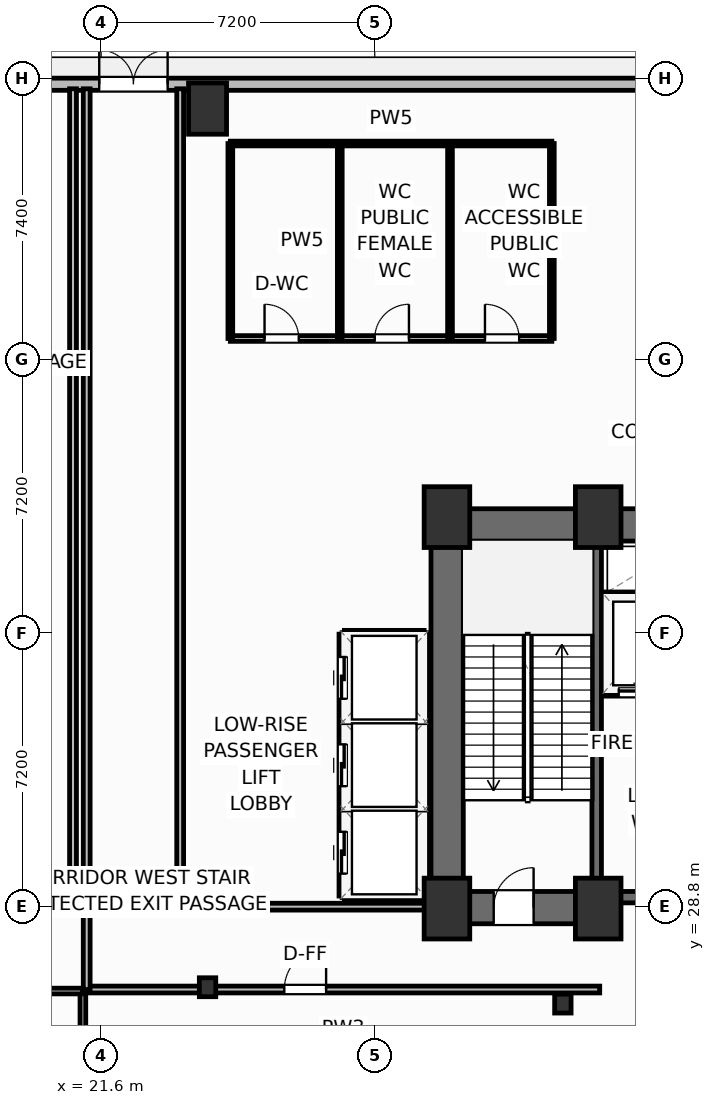
"""IFC4 building model, lengths in metres.
Left out: names, types, materials, properties, quantities, classifications, styles, units other than length and angle.
Written with IfcOpenShell. Run it as: python <this file> out.ifc"""

import sys

from ifc_helpers import new_model, si_unit, direction, frame, frame_2d, origin, origin_2d, place, context, subcontext, project, spatial, rectangle, i_section, extrude, element, fill, save


model = new_model("IFC4")
c1 = context("Model", 3, precision=1e-05, world=origin(), true_north=direction((0.0, 1.0)))
c2 = subcontext(c1, "Body", "Model", "MODEL_VIEW")
j1 = project(units=[si_unit("LENGTHUNIT", "METRE"), si_unit("PLANEANGLEUNIT", "RADIAN")], contexts=[c1])
p1 = place(None, origin())
s1 = spatial("IfcSite", under=j1, at=p1, CompositionType="ELEMENT")
p2 = place(p1, origin())
s2 = spatial("IfcBuilding", under=s1, at=p2, CompositionType="ELEMENT")
p3 = place(p2, origin())
s3 = spatial("IfcBuildingStorey", under=s2, at=p3, CompositionType="ELEMENT", Elevation=0.0)
for number, where, z_axis, x_axis in (
    (1, (30.7, 28.75, 0.0), (0.0, 0.0, 1.0), (1.0, 0.0, 0.0)),
    (2, (34.68, 28.75, 0.0), (0.0, 0.0, 1.0), (1.0, 0.0, 0.0)),
    (3, (30.7, 39.05, 0.0), (0.0, 0.0, 1.0), (1.0, 0.0, 0.0)),
    (4, (34.68, 39.05, 0.0), (0.0, 0.0, 1.0), (1.0, 0.0, 0.0)),
):
    element("IfcColumn", number, at=place(p3, frame(where, z_axis=z_axis, x_axis=x_axis)), inside=s3, PredefinedType="COLUMN", context=c2, shape_type="SweptSolid", body=[
        extrude(rectangle(XDim=1.2, YDim=1.6, at=origin_2d()), origin(), (0.0, 0.0, 1.0), 5.4),
    ])
for number, where, z_axis, x_axis in (
    (5, (33.75, 26.25, 0.0), (0.0, 0.0, 1.0), (1.0, 0.0, 0.0)),
    (6, (24.4, 26.68, 0.0), (0.0, 0.0, 1.0), (1.0, 0.0, 0.0)),
):
    element("IfcColumn", number, at=place(p3, frame(where, z_axis=z_axis, x_axis=x_axis)), inside=s3, PredefinedType="COLUMN", context=c2, shape_type="SweptSolid", body=[
        extrude(i_section(OverallWidth=0.432, OverallDepth=0.498, WebThickness=0.056, FlangeThickness=0.089, FilletRadius=0.025, at=origin_2d()), origin(), (0.0, 0.0, 1.0), 5.4),
    ])
p4 = place(p3, frame((30.28, 38.845, 0.0), z_axis=(0.0, 0.0, 1.0), x_axis=(1.0, 0.0, 0.0)))
e7 = element("IfcWall", 7, at=p4, inside=s3, PredefinedType="SHEAR", context=c2, shape_type="SweptSolid", body=[
    extrude(rectangle(XDim=17.84, YDim=0.85, at=frame_2d((8.92, 0.0))), origin(), (0.0, 0.0, 1.0), 5.12),
])
p5 = place(p3, frame((30.705, 29.2, 0.0), z_axis=(0.0, 0.0, 1.0), x_axis=(0.0, 1.0, 0.0)))
e8 = element("IfcWall", 8, at=p5, inside=s3, PredefinedType="SHEAR", context=c2, shape_type="SweptSolid", body=[
    extrude(rectangle(XDim=9.22, YDim=0.85, at=frame_2d((4.61, 0.0))), origin(), (0.0, 0.0, 1.0), 5.12),
])
p6 = place(p3, frame((30.28, 28.775, 0.0), z_axis=(0.0, 0.0, 1.0), x_axis=(1.0, 0.0, 0.0)))
e9 = element("IfcWall", 9, at=p6, inside=s3, PredefinedType="SHEAR", context=c2, shape_type="SweptSolid", body=[
    extrude(rectangle(XDim=4.52, YDim=0.85, at=frame_2d((2.26, 0.0))), origin(), (0.0, 0.0, 1.0), 5.12),
])
p7 = place(p6, frame((1.65, 0.0, 0.0)))
e10 = element("IfcOpeningElement", 10, at=p7, cuts=e9, PredefinedType="OPENING", context=c2, shape_type="SweptSolid", body=[
    extrude(rectangle(XDim=1.05, YDim=2.15, at=frame_2d((0.525, 1.075))), frame((0.0, 0.435, 0.0), z_axis=(0.0, -1.0, 0.0), x_axis=(1.0, 0.0, 0.0)), (0.0, 0.0, 1.0), 0.87),
])
p8 = place(p3, frame((34.8, 29.05, 0.0), z_axis=(0.0, 0.0, 1.0), x_axis=(1.0, 0.0, 0.0)))
e11 = element("IfcWall", 11, at=p8, inside=s3, PredefinedType="SHEAR", context=c2, shape_type="SweptSolid", body=[
    extrude(rectangle(XDim=8.8, YDim=0.3, at=frame_2d((4.4, 0.0))), origin(), (0.0, 0.0, 1.0), 5.12),
])
p9 = place(p8, frame((0.95, 0.0, 0.0)))
e12 = element("IfcOpeningElement", 12, at=p9, cuts=e11, PredefinedType="OPENING", context=c2, shape_type="SweptSolid", body=[
    extrude(rectangle(XDim=1.1, YDim=2.15, at=frame_2d((0.55, 1.075))), frame((0.0, 0.16, 0.0), z_axis=(0.0, -1.0, 0.0), x_axis=(1.0, 0.0, 0.0)), (0.0, 0.0, 1.0), 0.32),
])
p10 = place(p8, frame((6.75, 0.0, 0.0)))
e13 = element("IfcOpeningElement", 13, at=p10, cuts=e11, PredefinedType="OPENING", context=c2, shape_type="SweptSolid", body=[
    extrude(rectangle(XDim=1.1, YDim=2.15, at=frame_2d((0.55, 1.075))), frame((0.0, 0.16, 0.0), z_axis=(0.0, -1.0, 0.0), x_axis=(1.0, 0.0, 0.0)), (0.0, 0.0, 1.0), 0.32),
])
p11 = place(p8, frame((3.32, 0.0, 0.0)))
e14 = element("IfcOpeningElement", 14, at=p11, cuts=e11, PredefinedType="OPENING", context=c2, shape_type="SweptSolid", body=[
    extrude(rectangle(XDim=0.95, YDim=2.15, at=frame_2d((0.475, 1.075))), frame((0.0, 0.16, 0.0), z_axis=(0.0, -1.0, 0.0), x_axis=(1.0, 0.0, 0.0)), (0.0, 0.0, 1.0), 0.32),
])
p12 = place(p3, frame((34.64, 29.2, 0.0), z_axis=(0.0, 0.0, 1.0), x_axis=(0.0, 1.0, 0.0)))
e15 = element("IfcWall", 15, at=p12, inside=s3, PredefinedType="SHEAR", context=c2, shape_type="SweptSolid", body=[
    extrude(rectangle(XDim=9.22, YDim=0.25, at=frame_2d((4.61, 0.0))), origin(), (0.0, 0.0, 1.0), 5.12),
])
p13 = place(p3, frame((24.4, 49.8, 0.0), z_axis=(0.0, 0.0, 1.0), x_axis=(1.0, 0.0, 0.0)))
e16 = element("IfcColumn", 16, at=p13, inside=s3, PredefinedType="COLUMN", context=c2, shape_type="SweptSolid", body=[
    extrude(rectangle(XDim=1.0, YDim=1.35, at=origin_2d()), origin(), (0.0, 0.0, 1.0), 5.4),
])
p14 = place(p3, frame((5.6, 50.44, 0.0), z_axis=(0.0, 0.0, 1.0), x_axis=(1.0, 0.0, 0.0)))
e17 = element("IfcWall", 17, at=p14, inside=s3, PredefinedType="SOLIDWALL", context=c2, shape_type="SweptSolid", body=[
    extrude(rectangle(XDim=67.2, YDim=0.32, at=frame_2d((33.6, 0.0))), origin(), (0.0, 0.0, 1.0), 4.07),
])
p15 = place(p14, frame((10.05, 0.0, 0.0)))
e18 = element("IfcOpeningElement", 18, at=p15, cuts=e17, PredefinedType="OPENING", context=c2, shape_type="SweptSolid", body=[
    extrude(rectangle(XDim=1.8, YDim=2.2, at=frame_2d((0.9, 1.1))), frame((0.0, 0.17, 0.0), z_axis=(0.0, -1.0, 0.0), x_axis=(1.0, 0.0, 0.0)), (0.0, 0.0, 1.0), 0.34),
])
p16 = place(p14, frame((15.95, 0.0, 0.0)))
e19 = element("IfcOpeningElement", 19, at=p16, cuts=e17, PredefinedType="OPENING", context=c2, shape_type="SweptSolid", body=[
    extrude(rectangle(XDim=1.8, YDim=2.2, at=frame_2d((0.9, 1.1))), frame((0.0, 0.17, 0.0), z_axis=(0.0, -1.0, 0.0), x_axis=(1.0, 0.0, 0.0)), (0.0, 0.0, 1.0), 0.34),
])
p17 = place(p14, frame((43.45, 0.0, 0.0)))
e20 = element("IfcOpeningElement", 20, at=p17, cuts=e17, PredefinedType="OPENING", context=c2, shape_type="SweptSolid", body=[
    extrude(rectangle(XDim=1.8, YDim=2.2, at=frame_2d((0.9, 1.1))), frame((0.0, 0.17, 0.0), z_axis=(0.0, -1.0, 0.0), x_axis=(1.0, 0.0, 0.0)), (0.0, 0.0, 1.0), 0.34),
])
p18 = place(p14, frame((50.5, 0.0, 0.0)))
e21 = element("IfcOpeningElement", 21, at=p18, cuts=e17, PredefinedType="OPENING", context=c2, shape_type="SweptSolid", body=[
    extrude(rectangle(XDim=1.8, YDim=2.2, at=frame_2d((0.9, 1.1))), frame((0.0, 0.17, 0.0), z_axis=(0.0, -1.0, 0.0), x_axis=(1.0, 0.0, 0.0)), (0.0, 0.0, 1.0), 0.34),
])
p19 = place(p14, frame((57.8, 0.0, 0.0)))
e22 = element("IfcOpeningElement", 22, at=p19, cuts=e17, PredefinedType="OPENING", context=c2, shape_type="SweptSolid", body=[
    extrude(rectangle(XDim=6.0, YDim=3.2, at=frame_2d((3.0, 1.6))), frame((0.0, 0.17, 0.0), z_axis=(0.0, -1.0, 0.0), x_axis=(1.0, 0.0, 0.0)), (0.0, 0.0, 1.0), 0.34),
])
p20 = place(p3, frame((25.0, 43.75, 0.0), z_axis=(0.0, 0.0, 1.0), x_axis=(1.0, 0.0, 0.0)))
e23 = element("IfcWall", 23, at=p20, inside=s3, PredefinedType="PARTITIONING", context=c2, shape_type="SweptSolid", body=[
    extrude(rectangle(XDim=8.46, YDim=0.15, at=frame_2d((4.23, 0.0))), origin(), (0.0, 0.0, 1.0), 5.12),
])
p21 = place(p20, frame((0.9, 0.0, 0.0)))
e24 = element("IfcOpeningElement", 24, at=p21, cuts=e23, PredefinedType="OPENING", context=c2, shape_type="SweptSolid", body=[
    extrude(rectangle(XDim=0.9, YDim=2.05, at=frame_2d((0.45, 1.025))), frame((0.0, 0.085, 0.0), z_axis=(0.0, -1.0, 0.0), x_axis=(1.0, 0.0, 0.0)), (0.0, 0.0, 1.0), 0.17),
])
p22 = place(p20, frame((3.8, 0.0, 0.0)))
e25 = element("IfcOpeningElement", 25, at=p22, cuts=e23, PredefinedType="OPENING", context=c2, shape_type="SweptSolid", body=[
    extrude(rectangle(XDim=0.9, YDim=2.05, at=frame_2d((0.45, 1.025))), frame((0.0, 0.085, 0.0), z_axis=(0.0, -1.0, 0.0), x_axis=(1.0, 0.0, 0.0)), (0.0, 0.0, 1.0), 0.17),
])
p23 = place(p20, frame((6.7, 0.0, 0.0)))
e26 = element("IfcOpeningElement", 26, at=p23, cuts=e23, PredefinedType="OPENING", context=c2, shape_type="SweptSolid", body=[
    extrude(rectangle(XDim=0.9, YDim=2.05, at=frame_2d((0.45, 1.025))), frame((0.0, 0.085, 0.0), z_axis=(0.0, -1.0, 0.0), x_axis=(1.0, 0.0, 0.0)), (0.0, 0.0, 1.0), 0.17),
])
for number, where, z_axis, x_axis in (
    (27, (25.0, 43.75, 0.0), (0.0, 0.0, 1.0), (0.0, 1.0, 0.0)),
    (28, (27.88, 43.75, 0.0), (0.0, 0.0, 1.0), (0.0, 1.0, 0.0)),
    (29, (30.78, 43.75, 0.0), (0.0, 0.0, 1.0), (0.0, 1.0, 0.0)),
    (30, (33.46, 43.75, 0.0), (0.0, 0.0, 1.0), (0.0, 1.0, 0.0)),
):
    element("IfcWall", number, at=place(p3, frame(where, z_axis=z_axis, x_axis=x_axis)), inside=s3, PredefinedType="PARTITIONING", context=c2, shape_type="SweptSolid", body=[
        extrude(rectangle(XDim=5.13, YDim=0.125, at=frame_2d((2.565, 0.0))), origin(), (0.0, 0.0, 1.0), 5.12),
    ])
p24 = place(p3, frame((25.0, 48.88, 0.0), z_axis=(0.0, 0.0, 1.0), x_axis=(1.0, 0.0, 0.0)))
e31 = element("IfcWall", 31, at=p24, inside=s3, PredefinedType="PARTITIONING", context=c2, shape_type="SweptSolid", body=[
    extrude(rectangle(XDim=8.46, YDim=0.125, at=frame_2d((4.23, 0.0))), origin(), (0.0, 0.0, 1.0), 5.12),
])
p25 = place(p3, frame((18.47, 29.02, 0.0), z_axis=(0.0, 0.0, 1.0), x_axis=(1.0, 0.0, 0.0)))
e32 = element("IfcWall", 32, at=p25, inside=s3, PredefinedType="PARTITIONING", context=c2, shape_type="SweptSolid", body=[
    extrude(rectangle(XDim=2.39, YDim=0.18, at=frame_2d((1.195, 0.0))), origin(), (0.0, 0.0, 1.0), 5.12),
])
p26 = place(p3, frame((20.86, 29.02, 0.0), z_axis=(0.0, 0.0, 1.0), x_axis=(0.0, 1.0, 0.0)))
e33 = element("IfcWall", 33, at=p26, inside=s3, PredefinedType="PARTITIONING", context=c2, shape_type="SweptSolid", body=[
    extrude(rectangle(XDim=21.3, YDim=0.18, at=frame_2d((10.65, 0.0))), origin(), (0.0, 0.0, 1.0), 5.12),
])
p27 = place(p3, frame((21.22, 26.62, 0.0), z_axis=(0.0, 0.0, 1.0), x_axis=(1.0, 0.0, 0.0)))
e34 = element("IfcWall", 34, at=p27, inside=s3, PredefinedType="PARTITIONING", context=c2, shape_type="SweptSolid", body=[
    extrude(rectangle(XDim=13.5, YDim=0.18, at=frame_2d((6.75, 0.0))), origin(), (0.0, 0.0, 1.0), 4.332),
])
p28 = place(p27, frame((5.2, 0.0, 0.0)))
e35 = element("IfcOpeningElement", 35, at=p28, cuts=e34, PredefinedType="OPENING", context=c2, shape_type="SweptSolid", body=[
    extrude(rectangle(XDim=1.1, YDim=2.15, at=frame_2d((0.55, 1.075))), frame((0.0, 0.1, 0.0), z_axis=(0.0, -1.0, 0.0), x_axis=(1.0, 0.0, 0.0)), (0.0, 0.0, 1.0), 0.2),
])
p29 = place(p3, frame((21.22, 26.62, 0.0), z_axis=(0.0, 0.0, 1.0), x_axis=(0.0, 1.0, 0.0)))
e36 = element("IfcWall", 36, at=p29, inside=s3, PredefinedType="PARTITIONING", context=c2, shape_type="SweptSolid", body=[
    extrude(rectangle(XDim=23.7, YDim=0.18, at=frame_2d((11.85, 0.0))), origin(), (0.0, 0.0, 1.0), 5.12),
])
p30 = place(p3, frame((23.68, 28.8, 0.0), z_axis=(0.0, 0.0, 1.0), x_axis=(0.0, 1.0, 0.0)))
e37 = element("IfcWall", 37, at=p30, inside=s3, PredefinedType="PARTITIONING", context=c2, shape_type="SweptSolid", body=[
    extrude(rectangle(XDim=21.52, YDim=0.18, at=frame_2d((10.76, 0.0))), origin(), (0.0, 0.0, 1.0), 5.12),
])
p31 = place(p3, frame((23.68, 28.8, 0.0), z_axis=(0.0, 0.0, 1.0), x_axis=(1.0, 0.0, 0.0)))
e38 = element("IfcWall", 38, at=p31, inside=s3, PredefinedType="PARTITIONING", context=c2, shape_type="SweptSolid", body=[
    extrude(rectangle(XDim=6.6, YDim=0.18, at=frame_2d((3.3, 0.0))), origin(), (0.0, 0.0, 1.0), 5.12),
])
p32 = place(p3, frame((21.12, 19.24, 0.0), z_axis=(0.0, 0.0, 1.0), x_axis=(0.0, 1.0, 0.0)))
e39 = element("IfcWall", 39, at=p32, inside=s3, PredefinedType="PARTITIONING", context=c2, shape_type="SweptSolid", body=[
    extrude(rectangle(XDim=7.34, YDim=0.15, at=frame_2d((3.67, 0.0))), origin(), (0.0, 0.0, 1.0), 5.12),
])
p33 = place(p3, frame((18.6, 26.58, 0.0), z_axis=(0.0, 0.0, 1.0), x_axis=(1.0, 0.0, 0.0)))
e40 = element("IfcWall", 40, at=p33, inside=s3, PredefinedType="PARTITIONING", context=c2, shape_type="SweptSolid", body=[
    extrude(rectangle(XDim=2.52, YDim=0.15, at=frame_2d((1.26, 0.0))), origin(), (0.0, 0.0, 1.0), 5.12),
])
p34 = place(p3, frame((34.8, 34.44, 0.0), z_axis=(0.0, 0.0, 1.0), x_axis=(1.0, 0.0, 0.0)))
e41 = element("IfcWall", 41, at=p34, inside=s3, PredefinedType="PARTITIONING", context=c2, shape_type="SweptSolid", body=[
    extrude(rectangle(XDim=2.18, YDim=0.2, at=frame_2d((1.09, 0.0))), origin(), (0.0, 0.0, 1.0), 5.12),
])
p35 = place(p34, frame((0.42, 0.0, 0.0)))
e42 = element("IfcOpeningElement", 42, at=p35, cuts=e41, PredefinedType="OPENING", context=c2, shape_type="SweptSolid", body=[
    extrude(rectangle(XDim=1.2, YDim=2.2, at=frame_2d((0.6, 1.1))), frame((0.0, 0.11, 0.0), z_axis=(0.0, -1.0, 0.0), x_axis=(1.0, 0.0, 0.0)), (0.0, 0.0, 1.0), 0.22),
])
p36 = place(p3, frame((34.8, 36.98, 0.0), z_axis=(0.0, 0.0, 1.0), x_axis=(1.0, 0.0, 0.0)))
e43 = element("IfcWall", 43, at=p36, inside=s3, PredefinedType="PARTITIONING", context=c2, shape_type="SweptSolid", body=[
    extrude(rectangle(XDim=2.18, YDim=0.2, at=frame_2d((1.09, 0.0))), origin(), (0.0, 0.0, 1.0), 5.12),
])
for number, where, z_axis, x_axis in (
    (44, (28.02, 31.375, 0.0), (0.0, 0.0, 1.0), (1.0, 0.0, 0.0)),
    (45, (28.02, 33.675, 0.0), (0.0, 0.0, 1.0), (1.0, 0.0, 0.0)),
):
    element("IfcWall", number, at=place(p3, frame(where, z_axis=z_axis, x_axis=x_axis)), inside=s3, PredefinedType="PARTITIONING", context=c2, shape_type="SweptSolid", body=[
        extrude(rectangle(XDim=2.06, YDim=0.2, at=frame_2d((1.03, 0.0))), origin(), (0.0, 0.0, 1.0), 5.12),
    ])
for number, where, z_axis, x_axis in (
    (46, (28.0, 29.08, 0.0), (0.0, 0.0, 1.0), (1.0, 0.0, 0.0)),
    (47, (28.0, 35.97, 0.0), (0.0, 0.0, 1.0), (1.0, 0.0, 0.0)),
):
    element("IfcWall", number, at=place(p3, frame(where, z_axis=z_axis, x_axis=x_axis)), inside=s3, PredefinedType="PARTITIONING", context=c2, shape_type="SweptSolid", body=[
        extrude(rectangle(XDim=2.1, YDim=0.2, at=frame_2d((1.05, 0.0))), origin(), (0.0, 0.0, 1.0), 5.12),
    ])
p37 = place(p3, frame((30.12, 29.08, 0.0), z_axis=(0.0, 0.0, 1.0), x_axis=(0.0, 1.0, 0.0)))
e48 = element("IfcWall", 48, at=p37, inside=s3, PredefinedType="PARTITIONING", context=c2, shape_type="SweptSolid", body=[
    extrude(rectangle(XDim=6.89, YDim=0.2, at=frame_2d((3.445, 0.0))), origin(), (0.0, 0.0, 1.0), 5.12),
])
p38 = place(p3, frame((27.96, 29.08, 0.0), z_axis=(0.0, 0.0, 1.0), x_axis=(0.0, 1.0, 0.0)))
e49 = element("IfcWall", 49, at=p38, inside=s3, PredefinedType="PARTITIONING", context=c2, shape_type="SweptSolid", body=[
    extrude(rectangle(XDim=6.89, YDim=0.2, at=frame_2d((3.445, 0.0))), origin(), (0.0, 0.0, 1.0), 5.12),
])
p39 = place(p38, frame((0.59, 0.0, 0.0)))
e50 = element("IfcOpeningElement", 50, at=p39, cuts=e49, PredefinedType="OPENING", context=c2, shape_type="SweptSolid", body=[
    extrude(rectangle(XDim=1.1, YDim=2.15, at=frame_2d((0.55, 1.075))), frame((0.0, 0.11, 0.0), z_axis=(0.0, -1.0, 0.0), x_axis=(1.0, 0.0, 0.0)), (0.0, 0.0, 1.0), 0.22),
])
p40 = place(p38, frame((2.89, 0.0, 0.0)))
e51 = element("IfcOpeningElement", 51, at=p40, cuts=e49, PredefinedType="OPENING", context=c2, shape_type="SweptSolid", body=[
    extrude(rectangle(XDim=1.1, YDim=2.15, at=frame_2d((0.55, 1.075))), frame((0.0, 0.11, 0.0), z_axis=(0.0, -1.0, 0.0), x_axis=(1.0, 0.0, 0.0)), (0.0, 0.0, 1.0), 0.22),
])
p41 = place(p38, frame((5.19, 0.0, 0.0)))
e52 = element("IfcOpeningElement", 52, at=p41, cuts=e49, PredefinedType="OPENING", context=c2, shape_type="SweptSolid", body=[
    extrude(rectangle(XDim=1.1, YDim=2.15, at=frame_2d((0.55, 1.075))), frame((0.0, 0.11, 0.0), z_axis=(0.0, -1.0, 0.0), x_axis=(1.0, 0.0, 0.0)), (0.0, 0.0, 1.0), 0.22),
])
p42 = place(p16, origin())
e53 = element("IfcDoor", 53, at=p42, inside=s3, OperationType="DOUBLE_DOOR_SINGLE_SWING", PredefinedType="DOOR", context=c2, shape_type="SweptSolid", body=[
    extrude(rectangle(XDim=1.8, YDim=2.2, at=frame_2d((0.9, 1.1))), frame((0.0, 0.025, 0.0), z_axis=(0.0, -1.0, 0.0), x_axis=(1.0, 0.0, 0.0)), (0.0, 0.0, 1.0), 0.05),
])
fill(e19, e53)
p43 = place(p21, origin())
e54 = element("IfcDoor", 54, at=p43, inside=s3, OperationType="SINGLE_SWING_LEFT", PredefinedType="DOOR", context=c2, shape_type="SweptSolid", body=[
    extrude(rectangle(XDim=0.9, YDim=2.05, at=frame_2d((0.45, 1.025))), frame((0.0, 0.025, 0.0), z_axis=(0.0, -1.0, 0.0), x_axis=(1.0, 0.0, 0.0)), (0.0, 0.0, 1.0), 0.05),
])
fill(e24, e54)
p44 = place(p22, origin())
e55 = element("IfcDoor", 55, at=p44, inside=s3, OperationType="SINGLE_SWING_RIGHT", PredefinedType="DOOR", context=c2, shape_type="SweptSolid", body=[
    extrude(rectangle(XDim=0.9, YDim=2.05, at=frame_2d((0.45, 1.025))), frame((0.0, 0.025, 0.0), z_axis=(0.0, -1.0, 0.0), x_axis=(1.0, 0.0, 0.0)), (0.0, 0.0, 1.0), 0.05),
])
fill(e25, e55)
p45 = place(p23, origin())
e56 = element("IfcDoor", 56, at=p45, inside=s3, OperationType="SINGLE_SWING_LEFT", PredefinedType="DOOR", context=c2, shape_type="SweptSolid", body=[
    extrude(rectangle(XDim=0.9, YDim=2.05, at=frame_2d((0.45, 1.025))), frame((0.0, 0.025, 0.0), z_axis=(0.0, -1.0, 0.0), x_axis=(1.0, 0.0, 0.0)), (0.0, 0.0, 1.0), 0.05),
])
fill(e26, e56)
p46 = place(p28, origin())
e57 = element("IfcDoor", 57, at=p46, inside=s3, OperationType="SINGLE_SWING_RIGHT", PredefinedType="DOOR", context=c2, shape_type="SweptSolid", body=[
    extrude(rectangle(XDim=1.1, YDim=2.15, at=frame_2d((0.55, 1.075))), frame((0.0, 0.025, 0.0), z_axis=(0.0, -1.0, 0.0), x_axis=(1.0, 0.0, 0.0)), (0.0, 0.0, 1.0), 0.05),
])
fill(e35, e57)
p47 = place(p7, origin())
e58 = element("IfcDoor", 58, at=p47, inside=s3, OperationType="SINGLE_SWING_RIGHT", PredefinedType="DOOR", context=c2, shape_type="SweptSolid", body=[
    extrude(rectangle(XDim=1.05, YDim=2.15, at=frame_2d((0.525, 1.075))), frame((0.0, 0.025, 0.0), z_axis=(0.0, -1.0, 0.0), x_axis=(1.0, 0.0, 0.0)), (0.0, 0.0, 1.0), 0.05),
])
fill(e10, e58)
p48 = place(p35, origin())
e59 = element("IfcDoor", 59, at=p48, inside=s3, OperationType="SLIDING_TO_LEFT", PredefinedType="DOOR", context=c2, shape_type="SweptSolid", body=[
    extrude(rectangle(XDim=1.2, YDim=2.2, at=frame_2d((0.6, 1.1))), frame((0.0, 0.025, 0.0), z_axis=(0.0, -1.0, 0.0), x_axis=(1.0, 0.0, 0.0)), (0.0, 0.0, 1.0), 0.05),
])
fill(e42, e59)
p49 = place(p39, origin())
e60 = element("IfcDoor", 60, at=p49, inside=s3, OperationType="SLIDING_TO_LEFT", PredefinedType="DOOR", context=c2, shape_type="SweptSolid", body=[
    extrude(rectangle(XDim=1.1, YDim=2.15, at=frame_2d((0.55, 1.075))), frame((0.0, 0.025, 0.0), z_axis=(0.0, -1.0, 0.0), x_axis=(1.0, 0.0, 0.0)), (0.0, 0.0, 1.0), 0.05),
])
fill(e50, e60)
p50 = place(p40, origin())
e61 = element("IfcDoor", 61, at=p50, inside=s3, OperationType="SLIDING_TO_LEFT", PredefinedType="DOOR", context=c2, shape_type="SweptSolid", body=[
    extrude(rectangle(XDim=1.1, YDim=2.15, at=frame_2d((0.55, 1.075))), frame((0.0, 0.025, 0.0), z_axis=(0.0, -1.0, 0.0), x_axis=(1.0, 0.0, 0.0)), (0.0, 0.0, 1.0), 0.05),
])
fill(e51, e61)
p51 = place(p41, origin())
e62 = element("IfcDoor", 62, at=p51, inside=s3, OperationType="SLIDING_TO_LEFT", PredefinedType="DOOR", context=c2, shape_type="SweptSolid", body=[
    extrude(rectangle(XDim=1.1, YDim=2.15, at=frame_2d((0.55, 1.075))), frame((0.0, 0.025, 0.0), z_axis=(0.0, -1.0, 0.0), x_axis=(1.0, 0.0, 0.0)), (0.0, 0.0, 1.0), 0.05),
])
fill(e52, e62)
save(model, sys.argv[1])
